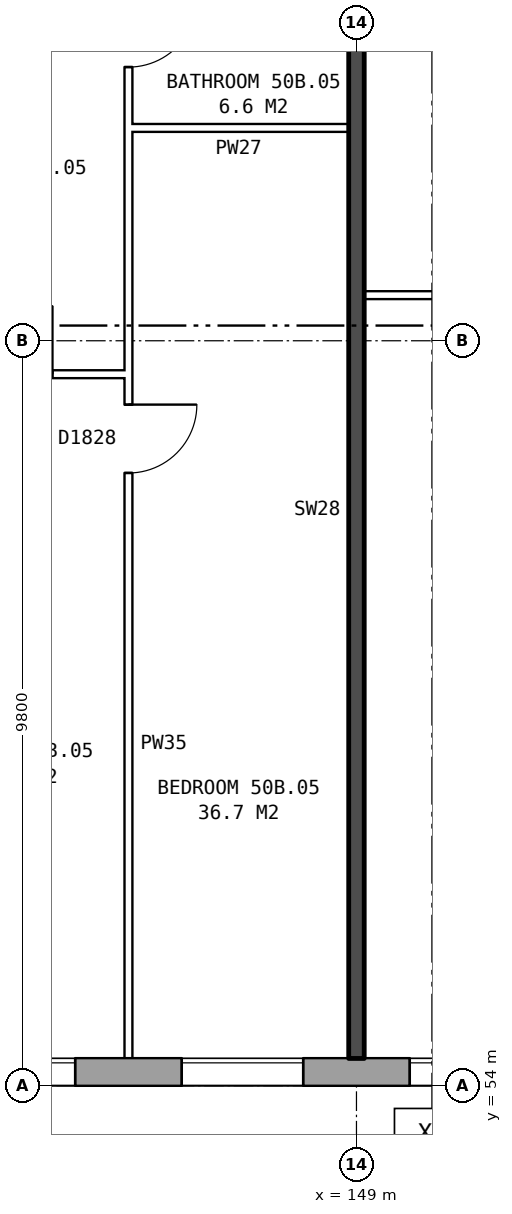
"""IFC4 building model, lengths in metres.
Left out: names, types, materials, properties, quantities, classifications, styles, units other than length and angle.
Written with IfcOpenShell. Run it as: python <this file> out.ifc"""

import sys

from ifc_helpers import new_model, si_unit, direction, frame, frame_2d, origin, place, context, subcontext, project, spatial, rectangle, extrude, element, fill, save


model = new_model("IFC4")
c1 = context("Model", 3, precision=1e-05, world=origin(), true_north=direction((0.0, 1.0)))
c2 = subcontext(c1, "Body", "Model", "MODEL_VIEW")
j1 = project(units=[si_unit("LENGTHUNIT", "METRE"), si_unit("PLANEANGLEUNIT", "RADIAN")], contexts=[c1])
p1 = place(None, origin())
s1 = spatial("IfcSite", under=j1, at=p1, CompositionType="ELEMENT")
p2 = place(p1, origin())
s2 = spatial("IfcBuilding", under=s1, at=p2, CompositionType="ELEMENT")
p3 = place(p2, frame((0.0, 0.0, 178.9)))
s3 = spatial("IfcBuildingStorey", under=s2, at=p3, CompositionType="ELEMENT", Elevation=178.9)
p4 = place(p3, frame((134.075, 54.18, 0.0), z_axis=(0.0, 0.0, 1.0), x_axis=(1.0, 0.0, 0.0)))
e1 = element("IfcWall", 1, at=p4, inside=s3, PredefinedType="STANDARD", context=c2, shape_type="SweptSolid", body=[
    extrude(rectangle(XDim=33.101, YDim=0.36, at=frame_2d((16.55, 0.0))), origin(), (0.0, 0.0, 1.0), 2.85),
])
p5 = place(p4, frame((0.625, 0.0, 0.8)))
e2 = element("IfcOpeningElement", 2, at=p5, cuts=e1, PredefinedType="OPENING", context=c2, shape_type="SweptSolid", body=[
    extrude(rectangle(XDim=1.6, YDim=1.8, at=frame_2d((0.8, 0.9))), frame((0.0, 0.19, 0.0), z_axis=(0.0, -1.0, 0.0), x_axis=(1.0, 0.0, 0.0)), (0.0, 0.0, 1.0), 0.38),
])
p6 = place(p4, frame((3.125, 0.0, 1.1)))
e3 = element("IfcOpeningElement", 3, at=p6, cuts=e1, PredefinedType="OPENING", context=c2, shape_type="SweptSolid", body=[
    extrude(rectangle(XDim=0.8, YDim=1.5, at=frame_2d((0.4, 0.75))), frame((0.0, 0.19, 0.0), z_axis=(0.0, -1.0, 0.0), x_axis=(1.0, 0.0, 0.0)), (0.0, 0.0, 1.0), 0.38),
])
p7 = place(p4, frame((6.625, 0.0, 0.8)))
e4 = element("IfcOpeningElement", 4, at=p7, cuts=e1, PredefinedType="OPENING", context=c2, shape_type="SweptSolid", body=[
    extrude(rectangle(XDim=1.6, YDim=1.8, at=frame_2d((0.8, 0.9))), frame((0.0, 0.19, 0.0), z_axis=(0.0, -1.0, 0.0), x_axis=(1.0, 0.0, 0.0)), (0.0, 0.0, 1.0), 0.38),
])
p8 = place(p4, frame((9.625, 0.0, 0.8)))
e5 = element("IfcOpeningElement", 5, at=p8, cuts=e1, PredefinedType="OPENING", context=c2, shape_type="SweptSolid", body=[
    extrude(rectangle(XDim=1.6, YDim=1.8, at=frame_2d((0.8, 0.9))), frame((0.0, 0.19, 0.0), z_axis=(0.0, -1.0, 0.0), x_axis=(1.0, 0.0, 0.0)), (0.0, 0.0, 1.0), 0.38),
])
p9 = place(p4, frame((12.625, 0.0, 0.8)))
e6 = element("IfcOpeningElement", 6, at=p9, cuts=e1, PredefinedType="OPENING", context=c2, shape_type="SweptSolid", body=[
    extrude(rectangle(XDim=1.6, YDim=1.8, at=frame_2d((0.8, 0.9))), frame((0.0, 0.19, 0.0), z_axis=(0.0, -1.0, 0.0), x_axis=(1.0, 0.0, 0.0)), (0.0, 0.0, 1.0), 0.38),
])
p10 = place(p4, frame((15.625, 0.0, 0.8)))
e7 = element("IfcOpeningElement", 7, at=p10, cuts=e1, PredefinedType="OPENING", context=c2, shape_type="SweptSolid", body=[
    extrude(rectangle(XDim=1.6, YDim=1.8, at=frame_2d((0.8, 0.9))), frame((0.0, 0.19, 0.0), z_axis=(0.0, -1.0, 0.0), x_axis=(1.0, 0.0, 0.0)), (0.0, 0.0, 1.0), 0.38),
])
p11 = place(p4, frame((18.625, 0.0, 0.8)))
e8 = element("IfcOpeningElement", 8, at=p11, cuts=e1, PredefinedType="OPENING", context=c2, shape_type="SweptSolid", body=[
    extrude(rectangle(XDim=1.6, YDim=1.8, at=frame_2d((0.8, 0.9))), frame((0.0, 0.19, 0.0), z_axis=(0.0, -1.0, 0.0), x_axis=(1.0, 0.0, 0.0)), (0.0, 0.0, 1.0), 0.38),
])
p12 = place(p4, frame((21.625, 0.0, 0.8)))
e9 = element("IfcOpeningElement", 9, at=p12, cuts=e1, PredefinedType="OPENING", context=c2, shape_type="SweptSolid", body=[
    extrude(rectangle(XDim=1.6, YDim=1.8, at=frame_2d((0.8, 0.9))), frame((0.0, 0.19, 0.0), z_axis=(0.0, -1.0, 0.0), x_axis=(1.0, 0.0, 0.0)), (0.0, 0.0, 1.0), 0.38),
])
p13 = place(p4, frame((24.625, 0.0, 0.8)))
e10 = element("IfcOpeningElement", 10, at=p13, cuts=e1, PredefinedType="OPENING", context=c2, shape_type="SweptSolid", body=[
    extrude(rectangle(XDim=1.6, YDim=1.8, at=frame_2d((0.8, 0.9))), frame((0.0, 0.19, 0.0), z_axis=(0.0, -1.0, 0.0), x_axis=(1.0, 0.0, 0.0)), (0.0, 0.0, 1.0), 0.38),
])
p14 = place(p4, frame((28.625, 0.0, 1.7)))
e11 = element("IfcOpeningElement", 11, at=p14, cuts=e1, PredefinedType="OPENING", context=c2, shape_type="SweptSolid", body=[
    extrude(rectangle(XDim=0.6, YDim=0.9, at=frame_2d((0.3, 0.45))), frame((0.0, 0.19, 0.0), z_axis=(0.0, -1.0, 0.0), x_axis=(1.0, 0.0, 0.0)), (0.0, 0.0, 1.0), 0.38),
])
p15 = place(p4, frame((30.625, 0.0, 0.8)))
e12 = element("IfcOpeningElement", 12, at=p15, cuts=e1, PredefinedType="OPENING", context=c2, shape_type="SweptSolid", body=[
    extrude(rectangle(XDim=1.6, YDim=1.8, at=frame_2d((0.8, 0.9))), frame((0.0, 0.19, 0.0), z_axis=(0.0, -1.0, 0.0), x_axis=(1.0, 0.0, 0.0)), (0.0, 0.0, 1.0), 0.38),
])
p16 = place(p4, frame((5.475, 0.0, 0.8)))
e13 = element("IfcOpeningElement", 13, at=p16, cuts=e1, PredefinedType="OPENING", context=c2, shape_type="SweptSolid", body=[
    extrude(rectangle(XDim=0.8, YDim=0.9, at=frame_2d((0.4, 0.45))), frame((0.0, 0.19, 0.0), z_axis=(0.0, -1.0, 0.0), x_axis=(1.0, 0.0, 0.0)), (0.0, 0.0, 1.0), 0.38),
])
p17 = place(p4, frame((29.525, 0.0, 0.8)))
e14 = element("IfcOpeningElement", 14, at=p17, cuts=e1, PredefinedType="OPENING", context=c2, shape_type="SweptSolid", body=[
    extrude(rectangle(XDim=0.8, YDim=1.8, at=frame_2d((0.4, 0.9))), frame((0.0, 0.19, 0.0), z_axis=(0.0, -1.0, 0.0), x_axis=(1.0, 0.0, 0.0)), (0.0, 0.0, 1.0), 0.38),
])
p18 = place(p3, frame((143.1, 63.36, 0.0), z_axis=(0.0, 0.0, 1.0), x_axis=(1.0, 0.0, 0.0)))
e15 = element("IfcWall", 15, at=p18, inside=s3, PredefinedType="PARTITIONING", context=c2, shape_type="SweptSolid", body=[
    extrude(rectangle(XDim=2.9, YDim=0.1, at=frame_2d((1.45, 0.0))), origin(), (0.0, 0.0, 1.0), 2.85),
])
p19 = place(p18, frame((1.0, 0.0, 0.0)))
e16 = element("IfcOpeningElement", 16, at=p19, cuts=e15, PredefinedType="OPENING", context=c2, shape_type="SweptSolid", body=[
    extrude(rectangle(XDim=0.9, YDim=2.1, at=frame_2d((0.45, 1.05))), frame((0.0, 0.06, 0.0), z_axis=(0.0, -1.0, 0.0), x_axis=(1.0, 0.0, 0.0)), (0.0, 0.0, 1.0), 0.12),
])
for number, where, z_axis, x_axis in (
    (17, (149.1, 64.4, 0.0), (0.0, 0.0, 1.0), (1.0, 0.0, 0.0)),
    (18, (146.0, 66.6, 0.0), (0.0, 0.0, 1.0), (1.0, 0.0, 0.0)),
):
    element("IfcWall", number, at=place(p3, frame(where, z_axis=z_axis, x_axis=x_axis)), inside=s3, PredefinedType="PARTITIONING", context=c2, shape_type="SweptSolid", body=[
        extrude(rectangle(XDim=2.9, YDim=0.1, at=frame_2d((1.45, 0.0))), origin(), (0.0, 0.0, 1.0), 2.85),
    ])
p20 = place(p3, frame((146.0, 54.36, 0.0), z_axis=(0.0, 0.0, 1.0), x_axis=(0.0, 1.0, 0.0)))
e19 = element("IfcWall", 19, at=p20, inside=s3, PredefinedType="PARTITIONING", context=c2, shape_type="SweptSolid", body=[
    extrude(rectangle(XDim=14.34, YDim=0.1, at=frame_2d((7.17, 0.0))), origin(), (0.0, 0.0, 1.0), 2.85),
])
p21 = place(p20, frame((7.7, 0.0, 0.0)))
e20 = element("IfcOpeningElement", 20, at=p21, cuts=e19, PredefinedType="OPENING", context=c2, shape_type="SweptSolid", body=[
    extrude(rectangle(XDim=0.9, YDim=2.1, at=frame_2d((0.45, 1.05))), frame((0.0, 0.06, 0.0), z_axis=(0.0, -1.0, 0.0), x_axis=(1.0, 0.0, 0.0)), (0.0, 0.0, 1.0), 0.12),
])
p22 = place(p20, frame((13.04, 0.0, 0.0)))
e21 = element("IfcOpeningElement", 21, at=p22, cuts=e19, PredefinedType="OPENING", context=c2, shape_type="SweptSolid", body=[
    extrude(rectangle(XDim=0.9, YDim=2.1, at=frame_2d((0.45, 1.05))), frame((0.0, 0.06, 0.0), z_axis=(0.0, -1.0, 0.0), x_axis=(1.0, 0.0, 0.0)), (0.0, 0.0, 1.0), 0.12),
])
p23 = place(p3, frame((149.0, 54.36, 0.0), z_axis=(0.0, 0.0, 1.0), x_axis=(0.0, 1.0, 0.0)))
e22 = element("IfcWall", 22, at=p23, inside=s3, PredefinedType="SOLIDWALL", context=c2, shape_type="SweptSolid", body=[
    extrude(rectangle(XDim=14.44, YDim=0.2, at=frame_2d((7.22, 0.0))), origin(), (0.0, 0.0, 1.0), 2.85),
])
p24 = place(p8, origin())
e23 = element("IfcWindow", 23, at=p24, inside=s3, PartitioningType="SINGLE_PANEL", PredefinedType="WINDOW", context=c2, shape_type="SweptSolid", body=[
    extrude(rectangle(XDim=1.6, YDim=1.8, at=frame_2d((0.8, 0.9))), frame((0.0, 0.15, 0.0), z_axis=(0.0, -1.0, 0.0), x_axis=(1.0, 0.0, 0.0)), (0.0, 0.0, 1.0), 0.06),
])
fill(e5, e23)
p25 = place(p9, origin())
e24 = element("IfcWindow", 24, at=p25, inside=s3, PartitioningType="SINGLE_PANEL", PredefinedType="WINDOW", context=c2, shape_type="SweptSolid", body=[
    extrude(rectangle(XDim=1.6, YDim=1.8, at=frame_2d((0.8, 0.9))), frame((0.0, 0.15, 0.0), z_axis=(0.0, -1.0, 0.0), x_axis=(1.0, 0.0, 0.0)), (0.0, 0.0, 1.0), 0.06),
])
fill(e6, e24)
p26 = place(p10, origin())
e25 = element("IfcWindow", 25, at=p26, inside=s3, PartitioningType="SINGLE_PANEL", PredefinedType="WINDOW", context=c2, shape_type="SweptSolid", body=[
    extrude(rectangle(XDim=1.6, YDim=1.8, at=frame_2d((0.8, 0.9))), frame((0.0, 0.15, 0.0), z_axis=(0.0, -1.0, 0.0), x_axis=(1.0, 0.0, 0.0)), (0.0, 0.0, 1.0), 0.06),
])
fill(e7, e25)
p27 = place(p21, frame((0.9, 0.0, 0.0), z_axis=(0.0, 0.0, 1.0), x_axis=(-1.0, 0.0, 0.0)))
e26 = element("IfcDoor", 26, at=p27, inside=s3, OperationType="SINGLE_SWING_LEFT", PredefinedType="DOOR", context=c2, shape_type="SweptSolid", body=[
    extrude(rectangle(XDim=0.9, YDim=2.1, at=frame_2d((0.45, 1.05))), frame((0.0, 0.025, 0.0), z_axis=(0.0, -1.0, 0.0), x_axis=(1.0, 0.0, 0.0)), (0.0, 0.0, 1.0), 0.05),
])
fill(e20, e26)
p28 = place(p22, frame((0.9, 0.0, 0.0), z_axis=(0.0, 0.0, 1.0), x_axis=(-1.0, 0.0, 0.0)))
e27 = element("IfcDoor", 27, at=p28, inside=s3, OperationType="SINGLE_SWING_LEFT", PredefinedType="DOOR", context=c2, shape_type="SweptSolid", body=[
    extrude(rectangle(XDim=0.9, YDim=2.1, at=frame_2d((0.45, 1.05))), frame((0.0, 0.025, 0.0), z_axis=(0.0, -1.0, 0.0), x_axis=(1.0, 0.0, 0.0)), (0.0, 0.0, 1.0), 0.05),
])
fill(e21, e27)
save(model, sys.argv[1])
